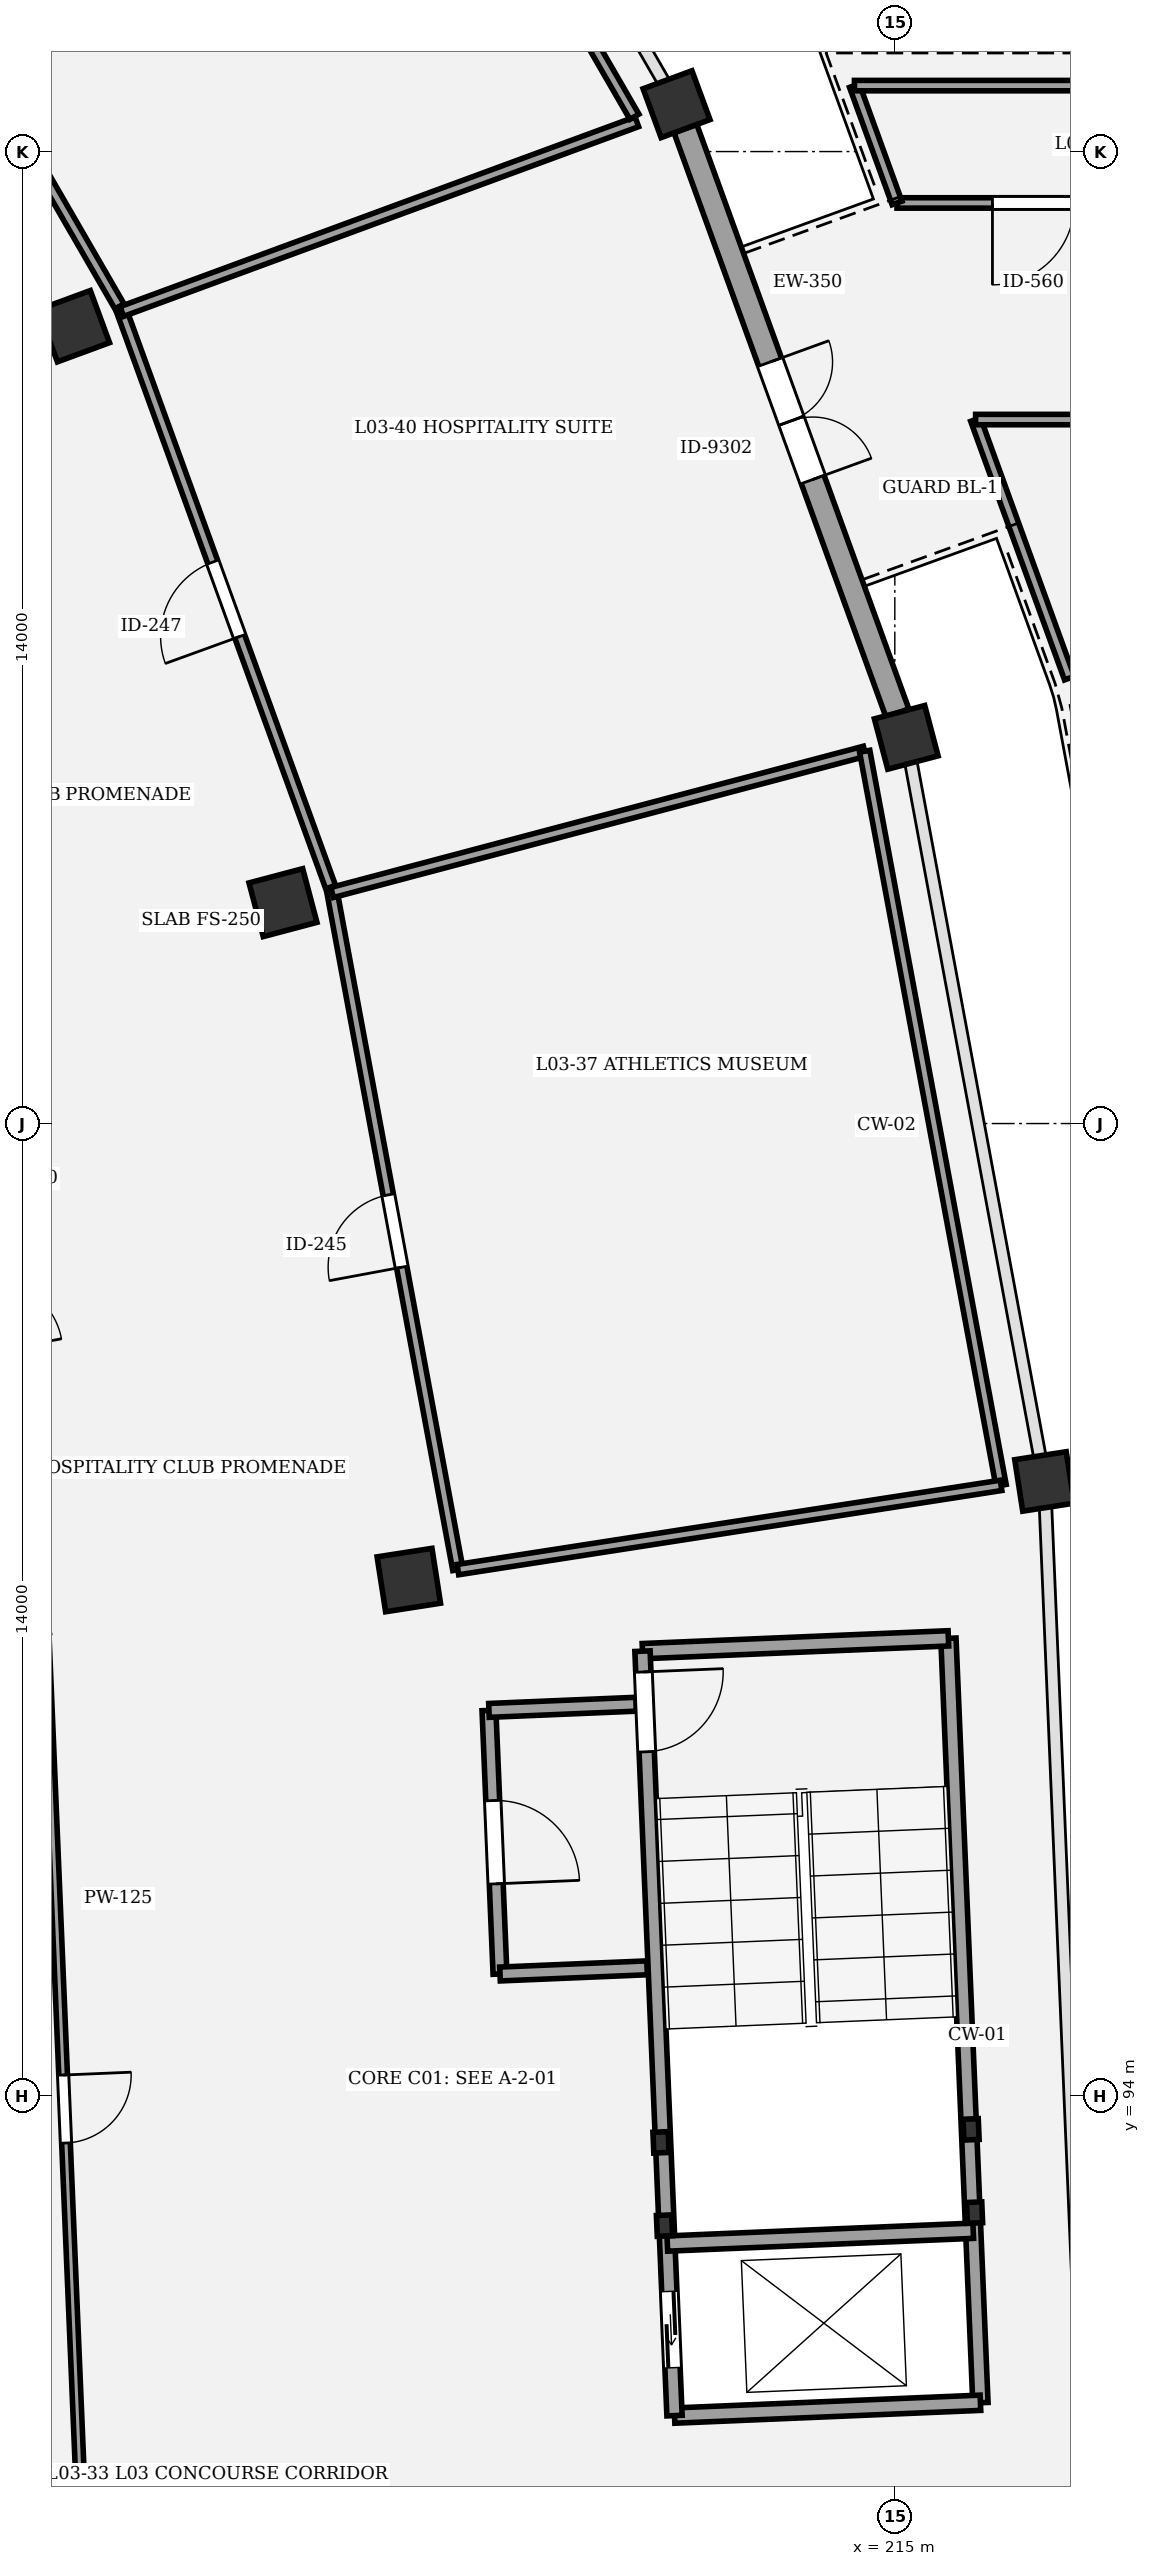
"""IFC4 building model, lengths in metres.
Left out: names, types, materials, properties, quantities, classifications, styles, units other than length and angle.
Written with IfcOpenShell. Run it as: python <this file> out.ifc"""

import sys

from ifc_helpers import new_model, si_unit, direction, frame, frame_2d, origin, origin_2d, place, context, subcontext, project, spatial, rectangle, extrude, element, fill, save


model = new_model("IFC4")
c1 = context("Model", 3, precision=1e-05, world=origin(), true_north=direction((0.0, 1.0)))
c2 = subcontext(c1, "Body", "Model", "MODEL_VIEW")
j1 = project(units=[si_unit("LENGTHUNIT", "METRE"), si_unit("PLANEANGLEUNIT", "RADIAN")], contexts=[c1])
p1 = place(None, origin())
s1 = spatial("IfcSite", under=j1, at=p1, CompositionType="ELEMENT")
p2 = place(p1, origin())
s2 = spatial("IfcBuilding", under=s1, at=p2, CompositionType="ELEMENT")
p3 = place(p2, frame((0.0, 0.0, 14.7)))
s3 = spatial("IfcBuildingStorey", under=s2, at=p3, CompositionType="ELEMENT", Elevation=14.7)
p4 = place(p3, frame((208.0, 101.425, 0.0), z_axis=(0.0, 0.0, 1.0), x_axis=(0.98817491911, 0.153330783737, 0.0)))
e1 = element("IfcColumn", 1, at=p4, inside=s3, PredefinedType="COLUMN", context=c2, shape_type="SweptSolid", body=[
    extrude(rectangle(XDim=0.8, YDim=0.8, at=origin_2d()), origin(), (0.0, 0.0, 1.0), 4.5),
])
p5 = place(p3, frame((217.156, 102.845, 0.0), z_axis=(0.0, 0.0, 1.0), x_axis=(0.98817491911, 0.153330783737, 0.0)))
e2 = element("IfcColumn", 2, at=p5, inside=s3, PredefinedType="COLUMN", context=c2, shape_type="SweptSolid", body=[
    extrude(rectangle(XDim=0.75, YDim=0.75, at=origin_2d()), origin(), (0.0, 0.0, 1.0), 4.5),
])
p6 = place(p3, frame((206.188, 111.182, 0.0), z_axis=(0.0, 0.0, 1.0), x_axis=(0.966600102017, 0.256289373133, 0.0)))
e3 = element("IfcColumn", 3, at=p6, inside=s3, PredefinedType="COLUMN", context=c2, shape_type="SweptSolid", body=[
    extrude(rectangle(XDim=0.8, YDim=0.8, at=origin_2d()), origin(), (0.0, 0.0, 1.0), 4.5),
])
p7 = place(p3, frame((215.165, 113.562, 0.0), z_axis=(0.0, 0.0, 1.0), x_axis=(0.966600102017, 0.256289373133, 0.0)))
e4 = element("IfcColumn", 4, at=p7, inside=s3, PredefinedType="COLUMN", context=c2, shape_type="SweptSolid", body=[
    extrude(rectangle(XDim=0.75, YDim=0.75, at=origin_2d()), origin(), (0.0, 0.0, 1.0), 4.5),
])
p8 = place(p3, frame((203.176, 119.484, 0.0), z_axis=(0.0, 0.0, 1.0), x_axis=(0.938372433776, 0.34562577382, 0.0)))
e5 = element("IfcColumn", 5, at=p8, inside=s3, PredefinedType="COLUMN", context=c2, shape_type="SweptSolid", body=[
    extrude(rectangle(XDim=0.8, YDim=0.8, at=origin_2d()), origin(), (0.0, 0.0, 1.0), 4.5),
])
p9 = place(p3, frame((211.856, 122.682, 0.0), z_axis=(0.0, 0.0, 1.0), x_axis=(0.938372433776, 0.34562577382, 0.0)))
e6 = element("IfcColumn", 6, at=p9, inside=s3, PredefinedType="COLUMN", context=c2, shape_type="SweptSolid", body=[
    extrude(rectangle(XDim=0.75, YDim=0.75, at=origin_2d()), origin(), (0.0, 0.0, 1.0), 4.5),
])
p10 = place(p3, frame((211.983, 122.332, 0.0), z_axis=(0.0, 0.0, 1.0), x_axis=(0.341014063491, -0.94005819421, 0.0)))
e7 = element("IfcWall", 7, at=p10, inside=s3, PredefinedType="STANDARD", context=c2, shape_type="SweptSolid", body=[
    extrude(rectangle(XDim=8.956, YDim=0.35, at=frame_2d((4.478, 0.0))), origin(), (0.0, 0.0, 1.0), 3.42),
])
p11 = place(p10, frame((3.578, 0.0, 0.0)))
e8 = element("IfcOpeningElement", 8, at=p11, cuts=e7, PredefinedType="OPENING", context=c2, shape_type="SweptSolid", body=[
    extrude(rectangle(XDim=1.8, YDim=2.4, at=frame_2d((0.9, 1.2))), frame((0.0, 0.185, 0.0), z_axis=(0.0, -1.0, 0.0), x_axis=(1.0, 0.0, 0.0)), (0.0, 0.0, 1.0), 0.37),
])
for number, where, z_axis, x_axis in (
    (9, (211.632, 93.325, 0.0), (0.0, 0.0, 1.0), (0.042, -0.999, 0.0)),
    (10, (211.682, 92.126, 0.0), (0.0, 0.0, 1.0), (0.042, -0.999, 0.0)),
    (11, (216.148, 92.314, 0.0), (0.0, 0.0, 1.0), (0.042, -0.999, 0.0)),
    (12, (216.098, 93.513, 0.0), (0.0, 0.0, 1.0), (0.042, -0.999, 0.0)),
):
    element("IfcColumn", number, at=place(p3, frame(where, z_axis=z_axis, x_axis=x_axis)), inside=s3, PredefinedType="COLUMN", context=c2, shape_type="SweptSolid", body=[
        extrude(rectangle(XDim=0.3, YDim=0.22, at=origin_2d()), origin(), (0.0, 0.0, 1.0), 4.5),
    ])
p12 = place(p3, frame((215.772, 100.585, 0.0), z_axis=(0.0, 0.0, 1.0), x_axis=(0.041871977473, -0.999122984173, 0.0)))
e13 = element("IfcWall", 13, at=p12, inside=s3, PredefinedType="SHEAR", context=c2, shape_type="SweptSolid", body=[
    extrude(rectangle(XDim=11.02, YDim=0.22, at=frame_2d((5.51, 0.0))), origin(), (0.0, 0.0, 1.0), 4.25),
])
for number, where, z_axis, x_axis in (
    (14, (211.365, 100.4, 0.0), (0.0, 0.0, 1.0), (0.999, 0.042, 0.0)),
    (15, (211.827, 89.39, 0.0), (0.0, 0.0, 1.0), (0.999, 0.042, 0.0)),
):
    element("IfcWall", number, at=place(p3, frame(where, z_axis=z_axis, x_axis=x_axis)), inside=s3, PredefinedType="SHEAR", context=c2, shape_type="SweptSolid", body=[
        extrude(rectangle(XDim=4.41, YDim=0.22, at=frame_2d((2.205, 0.0))), origin(), (0.0, 0.0, 1.0), 4.25),
    ])
p13 = place(p3, frame((211.365, 100.4, 0.0), z_axis=(0.0, 0.0, 1.0), x_axis=(0.041871977473, -0.999122984173, 0.0)))
e16 = element("IfcWall", 16, at=p13, inside=s3, PredefinedType="SHEAR", context=c2, shape_type="SweptSolid", body=[
    extrude(rectangle(XDim=11.02, YDim=0.22, at=frame_2d((5.51, 0.0))), origin(), (0.0, 0.0, 1.0), 4.25),
])
p14 = place(p13, frame((0.3, 0.0, 0.0)))
e17 = element("IfcOpeningElement", 17, at=p14, cuts=e16, PredefinedType="OPENING", context=c2, shape_type="SweptSolid", body=[
    extrude(rectangle(XDim=1.15, YDim=2.15, at=frame_2d((0.575, 1.075))), frame((0.0, 0.12, 0.0), z_axis=(0.0, -1.0, 0.0), x_axis=(1.0, 0.0, 0.0)), (0.0, 0.0, 1.0), 0.24),
])
p15 = place(p13, frame((9.23, 0.0, 0.0)))
e18 = element("IfcOpeningElement", 18, at=p15, cuts=e16, PredefinedType="OPENING", context=c2, shape_type="SweptSolid", body=[
    extrude(rectangle(XDim=1.1, YDim=2.15, at=frame_2d((0.55, 1.075))), frame((0.0, 0.12, 0.0), z_axis=(0.0, -1.0, 0.0), x_axis=(1.0, 0.0, 0.0)), (0.0, 0.0, 1.0), 0.24),
])
p16 = place(p3, frame((211.723, 91.868, 0.0), z_axis=(0.0, 0.0, 1.0), x_axis=(0.999121521721, 0.041906859039, 0.0)))
e19 = element("IfcWall", 19, at=p16, inside=s3, PredefinedType="SHEAR", context=c2, shape_type="SweptSolid", body=[
    extrude(rectangle(XDim=4.41, YDim=0.22, at=frame_2d((2.205, 0.0))), origin(), (0.0, 0.0, 1.0), 4.25),
])
p17 = place(p3, frame((209.154, 99.547, 0.0), z_axis=(0.0, 0.0, 1.0), x_axis=(0.041889762691, -0.999122238658, 0.0)))
e20 = element("IfcWall", 20, at=p17, inside=s3, PredefinedType="PARTITIONING", context=c2, shape_type="SweptSolid", body=[
    extrude(rectangle(XDim=3.8, YDim=0.2, at=frame_2d((1.9, 0.0))), origin(), (0.0, 0.0, 1.0), 3.35),
])
p18 = place(p17, frame((1.3, 0.0, 0.0)))
e21 = element("IfcOpeningElement", 21, at=p18, cuts=e20, PredefinedType="OPENING", context=c2, shape_type="SweptSolid", body=[
    extrude(rectangle(XDim=1.2, YDim=2.18, at=frame_2d((0.6, 1.09))), frame((0.0, 0.11, 0.0), z_axis=(0.0, -1.0, 0.0), x_axis=(1.0, 0.0, 0.0)), (0.0, 0.0, 1.0), 0.22),
])
for number, where, z_axis, x_axis in (
    (22, (209.154, 99.547, 0.0), (0.0, 0.0, 1.0), (0.999, 0.042, 0.0)),
    (23, (209.313, 95.75, 0.0), (0.0, 0.0, 1.0), (0.999, 0.042, 0.0)),
):
    element("IfcWall", number, at=place(p3, frame(where, z_axis=z_axis, x_axis=x_axis)), inside=s3, PredefinedType="PARTITIONING", context=c2, shape_type="SweptSolid", body=[
        extrude(rectangle(XDim=2.12, YDim=0.2, at=frame_2d((1.06, 0.0))), origin(), (0.0, 0.0, 1.0), 3.35),
    ])
p19 = place(p3, frame((202.758, 100.571, 0.0), z_axis=(0.0, 0.0, 1.0), x_axis=(0.041894479342, -0.999122040894, 0.0)))
e24 = element("IfcWall", 24, at=p19, inside=s3, PredefinedType="PARTITIONING", context=c2, shape_type="SweptSolid", body=[
    extrude(rectangle(XDim=13.543, YDim=0.125, at=frame_2d((6.771, 0.0))), origin(), (0.0, 0.0, 1.0), 3.25),
])
p20 = place(p19, frame((6.281, 0.0, 0.0)))
e25 = element("IfcOpeningElement", 25, at=p20, cuts=e24, PredefinedType="OPENING", context=c2, shape_type="SweptSolid", body=[
    extrude(rectangle(XDim=0.98, YDim=2.3, at=frame_2d((0.49, 1.15))), frame((0.0, 0.073, 0.0), z_axis=(0.0, -1.0, 0.0), x_axis=(1.0, 0.0, 0.0)), (0.0, 0.0, 1.0), 0.145),
])
p21 = place(p3, frame((208.707, 101.575, 0.0), z_axis=(0.0, 0.0, 1.0), x_axis=(-0.182618024057, 0.983183938686, 0.0)))
e26 = element("IfcWall", 26, at=p21, inside=s3, PredefinedType="PARTITIONING", context=c2, shape_type="SweptSolid", body=[
    extrude(rectangle(XDim=9.92, YDim=0.15, at=frame_2d((4.96, 0.0))), origin(), (0.0, 0.0, 1.0), 3.25),
])
p22 = place(p21, frame((4.43, 0.0, 0.0)))
e27 = element("IfcOpeningElement", 27, at=p22, cuts=e26, PredefinedType="OPENING", context=c2, shape_type="SweptSolid", body=[
    extrude(rectangle(XDim=1.06, YDim=2.3, at=frame_2d((0.53, 1.15))), frame((0.0, 0.085, 0.0), z_axis=(0.0, -1.0, 0.0), x_axis=(1.0, 0.0, 0.0)), (0.0, 0.0, 1.0), 0.17),
])
p23 = place(p3, frame((206.874, 111.405, 0.0), z_axis=(0.0, 0.0, 1.0), x_axis=(-0.341031741571, 0.940051781149, 0.0)))
e28 = element("IfcWall", 28, at=p23, inside=s3, PredefinedType="PARTITIONING", context=c2, shape_type="SweptSolid", body=[
    extrude(rectangle(XDim=8.82, YDim=0.15, at=frame_2d((4.41, 0.0))), origin(), (0.0, 0.0, 1.0), 3.25),
])
p24 = place(p23, frame((3.84, 0.0, 0.0)))
e29 = element("IfcOpeningElement", 29, at=p24, cuts=e28, PredefinedType="OPENING", context=c2, shape_type="SweptSolid", body=[
    extrude(rectangle(XDim=1.14, YDim=2.3, at=frame_2d((0.57, 1.15))), frame((0.0, 0.085, 0.0), z_axis=(0.0, -1.0, 0.0), x_axis=(1.0, 0.0, 0.0)), (0.0, 0.0, 1.0), 0.17),
])
p25 = place(p3, frame((203.833, 119.769, 0.0), z_axis=(0.0, 0.0, 1.0), x_axis=(-0.500559280672, 0.865702262059, 0.0)))
e30 = element("IfcWall", 30, at=p25, inside=s3, PredefinedType="PARTITIONING", context=c2, shape_type="SweptSolid", body=[
    extrude(rectangle(XDim=8.375, YDim=0.15, at=frame_2d((4.187, 0.0))), origin(), (0.0, 0.0, 1.0), 3.25),
])
p26 = place(p25, frame((3.557, 0.0, 0.0)))
e31 = element("IfcOpeningElement", 31, at=p26, cuts=e30, PredefinedType="OPENING", context=c2, shape_type="SweptSolid", body=[
    extrude(rectangle(XDim=1.26, YDim=2.3, at=frame_2d((0.63, 1.15))), frame((0.0, 0.085, 0.0), z_axis=(0.0, -1.0, 0.0), x_axis=(1.0, 0.0, 0.0)), (0.0, 0.0, 1.0), 0.17),
])
p27 = place(p3, frame((225.64, 121.26, 0.0), z_axis=(0.0, 0.0, 1.0), x_axis=(-1.0, 0.0, 0.0)))
e32 = element("IfcWall", 32, at=p27, inside=s3, PredefinedType="PARTITIONING", context=c2, shape_type="SweptSolid", body=[
    extrude(rectangle(XDim=10.608, YDim=0.15, at=frame_2d((5.304, 0.0))), origin(), (0.0, 0.0, 1.0), 3.25),
])
p28 = place(p27, frame((8.054, 0.0, 0.0)))
e33 = element("IfcOpeningElement", 33, at=p28, cuts=e32, PredefinedType="OPENING", context=c2, shape_type="SweptSolid", body=[
    extrude(rectangle(XDim=1.18, YDim=2.2, at=frame_2d((0.59, 1.1))), frame((0.0, 0.085, 0.0), z_axis=(0.0, -1.0, 0.0), x_axis=(1.0, 0.0, 0.0)), (0.0, 0.0, 1.0), 0.17),
])
p29 = place(p3, frame((206.895, 111.328, 0.0), z_axis=(0.0, 0.0, 1.0), x_axis=(0.966593450181, 0.25631445934, 0.0)))
e34 = element("IfcWall", 34, at=p29, inside=s3, PredefinedType="PARTITIONING", context=c2, shape_type="SweptSolid", body=[
    extrude(rectangle(XDim=7.936, YDim=0.15, at=frame_2d((3.968, 0.0))), origin(), (0.0, 0.0, 1.0), 3.25),
])
p30 = place(p3, frame((214.566, 113.362, 0.0), z_axis=(0.0, 0.0, 1.0), x_axis=(0.182607868301, -0.983185824976, 0.0)))
e35 = element("IfcWall", 35, at=p30, inside=s3, PredefinedType="PARTITIONING", context=c2, shape_type="SweptSolid", body=[
    extrude(rectangle(XDim=10.755, YDim=0.15, at=frame_2d((5.377, 0.0))), origin(), (0.0, 0.0, 1.0), 3.25),
])
p31 = place(p3, frame((216.53, 102.789, 0.0), z_axis=(0.0, 0.0, 1.0), x_axis=(-0.988185582016, -0.153262048451, 0.0)))
e36 = element("IfcWall", 36, at=p31, inside=s3, PredefinedType="PARTITIONING", context=c2, shape_type="SweptSolid", body=[
    extrude(rectangle(XDim=7.917, YDim=0.15, at=frame_2d((3.958, 0.0))), origin(), (0.0, 0.0, 1.0), 3.25),
])
p32 = place(p3, frame((203.866, 119.696, 0.0), z_axis=(0.0, 0.0, 1.0), x_axis=(0.938346807893, 0.345695340028, 0.0)))
e37 = element("IfcWall", 37, at=p32, inside=s3, PredefinedType="PARTITIONING", context=c2, shape_type="SweptSolid", body=[
    extrude(rectangle(XDim=7.905, YDim=0.15, at=frame_2d((3.952, 0.0))), origin(), (0.0, 0.0, 1.0), 3.25),
])
p33 = place(p3, frame((206.704, 130.362, 0.0), z_axis=(0.0, 0.0, 1.0), x_axis=(0.500574107164, -0.865693689036, 0.0)))
e38 = element("IfcWall", 38, at=p33, inside=s3, PredefinedType="PARTITIONING", context=c2, shape_type="SweptSolid", body=[
    extrude(rectangle(XDim=9.08, YDim=0.15, at=frame_2d((4.54, 0.0))), origin(), (0.0, 0.0, 1.0), 3.25),
])
p34 = place(p3, frame((217.515, 114.415, 0.0), z_axis=(0.0, 0.0, 1.0), x_axis=(-0.341035525383, 0.94005040845, 0.0)))
e39 = element("IfcWall", 39, at=p34, inside=s3, PredefinedType="PARTITIONING", context=c2, shape_type="SweptSolid", body=[
    extrude(rectangle(XDim=3.962, YDim=0.15, at=frame_2d((1.981, 0.0))), origin(), (0.0, 0.0, 1.0), 3.25),
])
p35 = place(p3, frame((216.163, 118.14, 0.0), z_axis=(0.0, 0.0, 1.0), x_axis=(1.0, 0.0, 0.0)))
e40 = element("IfcWall", 40, at=p35, inside=s3, PredefinedType="PARTITIONING", context=c2, shape_type="SweptSolid", body=[
    extrude(rectangle(XDim=9.477, YDim=0.15, at=frame_2d((4.738, 0.0))), origin(), (0.0, 0.0, 1.0), 3.25),
])
p36 = place(p3, frame((215.031, 121.26, 0.0), z_axis=(0.0, 0.0, 1.0), x_axis=(-0.341012375502, 0.940058806541, 0.0)))
e41 = element("IfcWall", 41, at=p36, inside=s3, PredefinedType="PARTITIONING", context=c2, shape_type="SweptSolid", body=[
    extrude(rectangle(XDim=1.798, YDim=0.15, at=frame_2d((0.899, 0.0))), origin(), (0.0, 0.0, 1.0), 3.25),
])
p37 = place(p3, frame((214.418, 122.95, 0.0), z_axis=(0.0, 0.0, 1.0), x_axis=(1.0, 0.0, 0.0)))
e42 = element("IfcWall", 42, at=p37, inside=s3, PredefinedType="PARTITIONING", context=c2, shape_type="SweptSolid", body=[
    extrude(rectangle(XDim=11.221, YDim=0.15, at=frame_2d((5.611, 0.0))), origin(), (0.0, 0.0, 1.0), 3.25),
])
p38 = place(p11, origin())
e43 = element("IfcDoor", 43, at=p38, inside=s3, OperationType="DOUBLE_DOOR_SINGLE_SWING", PredefinedType="DOOR", context=c2, shape_type="SweptSolid", body=[
    extrude(rectangle(XDim=1.8, YDim=2.4, at=frame_2d((0.9, 1.2))), frame((0.0, 0.025, 0.0), z_axis=(0.0, -1.0, 0.0), x_axis=(1.0, 0.0, 0.0)), (0.0, 0.0, 1.0), 0.05),
])
fill(e8, e43)
p39 = place(p14, origin())
e44 = element("IfcDoor", 44, at=p39, inside=s3, OperationType="SINGLE_SWING_LEFT", PredefinedType="DOOR", context=c2, shape_type="SweptSolid", body=[
    extrude(rectangle(XDim=1.15, YDim=2.15, at=frame_2d((0.575, 1.075))), frame((0.0, 0.025, 0.0), z_axis=(0.0, -1.0, 0.0), x_axis=(1.0, 0.0, 0.0)), (0.0, 0.0, 1.0), 0.05),
])
fill(e17, e44)
p40 = place(p15, origin())
e45 = element("IfcDoor", 45, at=p40, inside=s3, OperationType="DOUBLE_DOOR_SLIDING", PredefinedType="DOOR", context=c2, shape_type="SweptSolid", body=[
    extrude(rectangle(XDim=1.1, YDim=2.15, at=frame_2d((0.55, 1.075))), frame((0.0, 0.025, 0.0), z_axis=(0.0, -1.0, 0.0), x_axis=(1.0, 0.0, 0.0)), (0.0, 0.0, 1.0), 0.05),
])
fill(e18, e45)
p41 = place(p18, origin())
e46 = element("IfcDoor", 46, at=p41, inside=s3, OperationType="SINGLE_SWING_RIGHT", PredefinedType="DOOR", context=c2, shape_type="SweptSolid", body=[
    extrude(rectangle(XDim=1.2, YDim=2.18, at=frame_2d((0.6, 1.09))), frame((0.0, 0.025, 0.0), z_axis=(0.0, -1.0, 0.0), x_axis=(1.0, 0.0, 0.0)), (0.0, 0.0, 1.0), 0.05),
])
fill(e21, e46)
p42 = place(p20, origin())
e47 = element("IfcDoor", 47, at=p42, inside=s3, OperationType="SINGLE_SWING_LEFT", PredefinedType="DOOR", context=c2, shape_type="SweptSolid", body=[
    extrude(rectangle(XDim=0.98, YDim=2.3, at=frame_2d((0.49, 1.15))), frame((0.0, 0.025, 0.0), z_axis=(0.0, -1.0, 0.0), x_axis=(1.0, 0.0, 0.0)), (0.0, 0.0, 1.0), 0.05),
])
fill(e25, e47)
p43 = place(p22, origin())
e48 = element("IfcDoor", 48, at=p43, inside=s3, OperationType="SINGLE_SWING_LEFT", PredefinedType="DOOR", context=c2, shape_type="SweptSolid", body=[
    extrude(rectangle(XDim=1.06, YDim=2.3, at=frame_2d((0.53, 1.15))), frame((0.0, 0.025, 0.0), z_axis=(0.0, -1.0, 0.0), x_axis=(1.0, 0.0, 0.0)), (0.0, 0.0, 1.0), 0.05),
])
fill(e27, e48)
p44 = place(p24, origin())
e49 = element("IfcDoor", 49, at=p44, inside=s3, OperationType="SINGLE_SWING_LEFT", PredefinedType="DOOR", context=c2, shape_type="SweptSolid", body=[
    extrude(rectangle(XDim=1.14, YDim=2.3, at=frame_2d((0.57, 1.15))), frame((0.0, 0.025, 0.0), z_axis=(0.0, -1.0, 0.0), x_axis=(1.0, 0.0, 0.0)), (0.0, 0.0, 1.0), 0.05),
])
fill(e29, e49)
p45 = place(p28, origin())
e50 = element("IfcDoor", 50, at=p45, inside=s3, OperationType="SINGLE_SWING_RIGHT", PredefinedType="DOOR", context=c2, shape_type="SweptSolid", body=[
    extrude(rectangle(XDim=1.18, YDim=2.2, at=frame_2d((0.59, 1.1))), frame((0.0, 0.025, 0.0), z_axis=(0.0, -1.0, 0.0), x_axis=(1.0, 0.0, 0.0)), (0.0, 0.0, 1.0), 0.05),
])
fill(e33, e50)
save(model, sys.argv[1])
